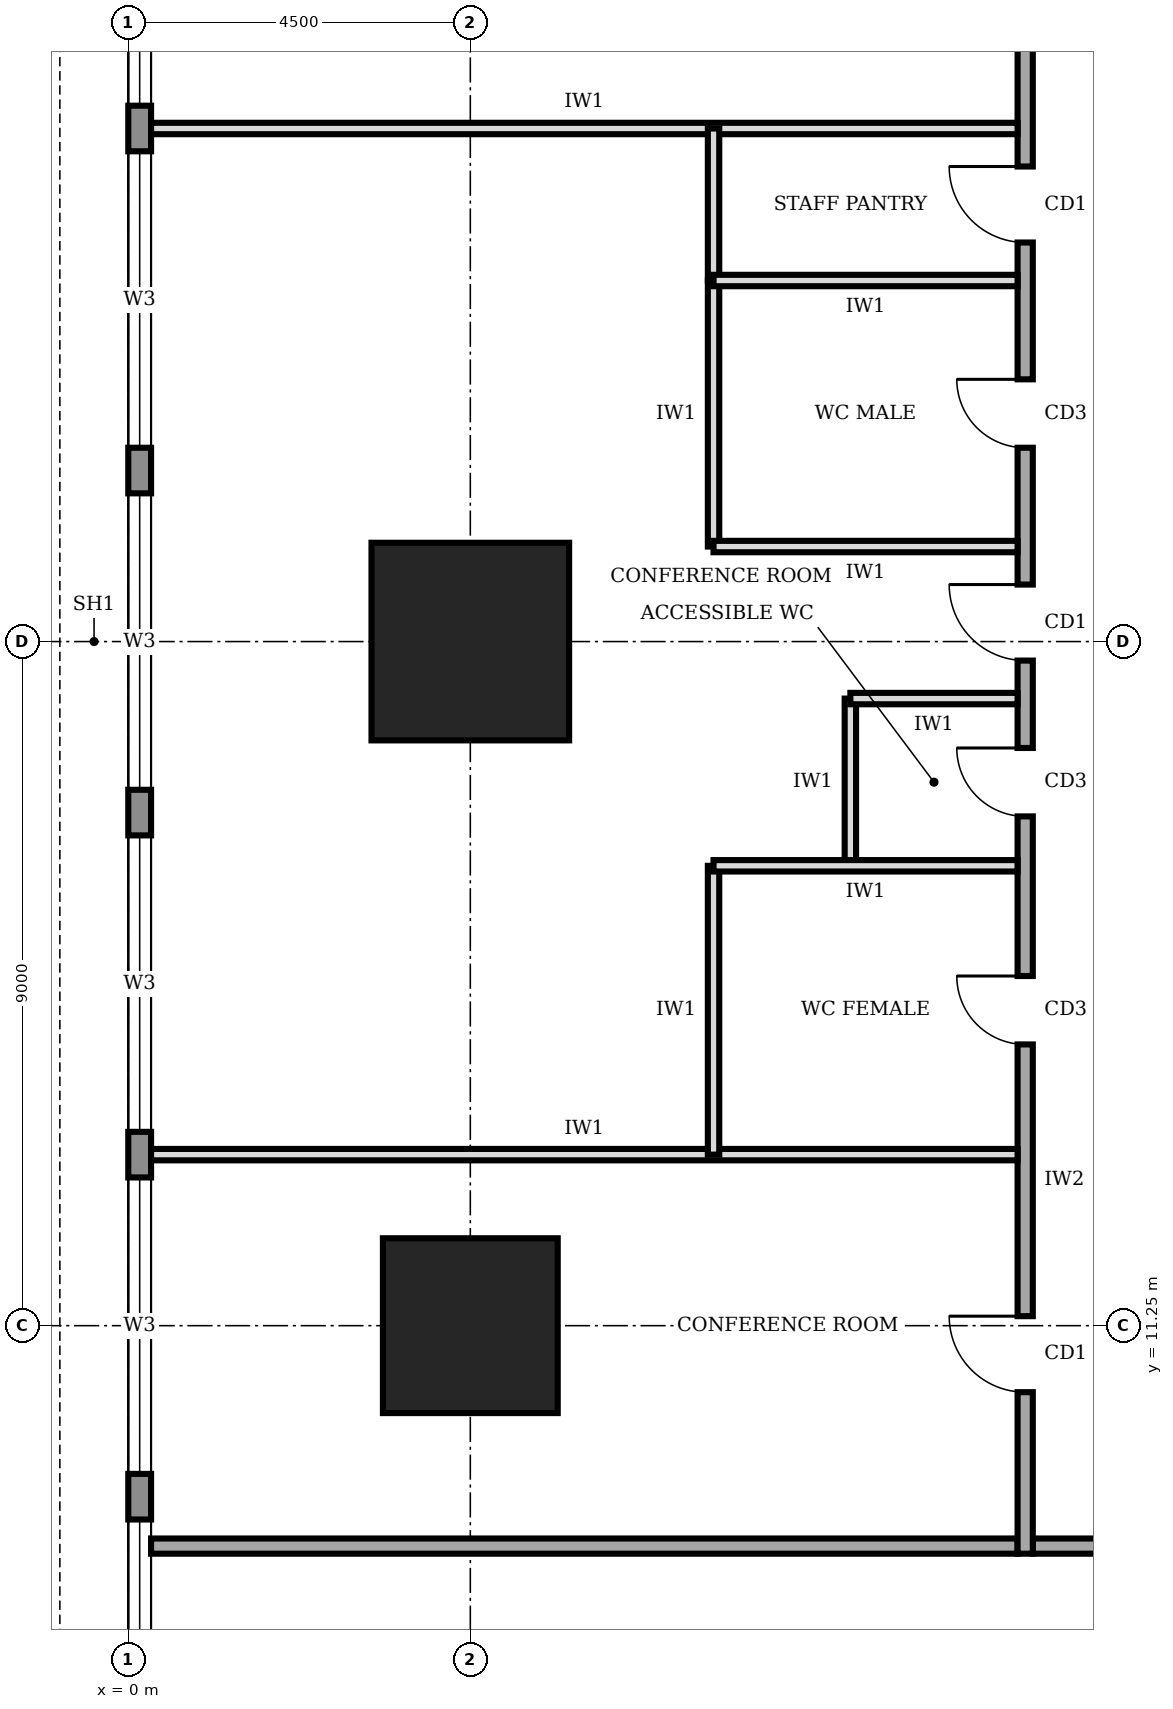
"""IFC4 building model, lengths in metres.
Left out: names, types, materials, properties, quantities, classifications, styles, units other than length and angle.
Written with IfcOpenShell. Run it as: python <this file> out.ifc"""

import sys

from ifc_helpers import new_model, si_unit, direction, frame, frame_2d, origin, origin_2d, place, context, subcontext, project, spatial, rectangle, extrude, element, fill, save


model = new_model("IFC4")
c1 = context("Model", 3, precision=1e-05, world=origin(), true_north=direction((0.0, 1.0)))
c2 = subcontext(c1, "Body", "Model", "MODEL_VIEW")
j1 = project(units=[si_unit("LENGTHUNIT", "METRE"), si_unit("PLANEANGLEUNIT", "RADIAN")], contexts=[c1])
p1 = place(None, origin())
s1 = spatial("IfcSite", under=j1, at=p1, CompositionType="ELEMENT")
p2 = place(p1, origin())
s2 = spatial("IfcBuilding", under=s1, at=p2, CompositionType="ELEMENT")
p3 = place(p2, frame((0.0, 0.0, 101.0)))
s3 = spatial("IfcBuildingStorey", under=s2, at=p3, CompositionType="ELEMENT", Elevation=101.0)
p4 = place(p3, frame((4.5, 11.25, 0.0), z_axis=(0.0, 0.0, 1.0), x_axis=(1.0, 0.0, 0.0)))
e1 = element("IfcColumn", 1, at=p4, inside=s3, PredefinedType="COLUMN", context=c2, shape_type="SweptSolid", body=[
    extrude(rectangle(XDim=2.3, YDim=2.3, at=origin_2d()), origin(), (0.0, 0.0, 1.0), 4.0),
])
p5 = place(p3, frame((4.5, 20.25, 0.0), z_axis=(0.0, 0.0, 1.0), x_axis=(1.0, 0.0, 0.0)))
e2 = element("IfcColumn", 2, at=p5, inside=s3, PredefinedType="COLUMN", context=c2, shape_type="SweptSolid", body=[
    extrude(rectangle(XDim=2.6, YDim=2.6, at=origin_2d()), origin(), (0.0, 0.0, 1.0), 4.0),
])
p6 = place(p3, frame((0.15, 35.98, 0.0), z_axis=(0.0, 0.0, 1.0), x_axis=(0.0, -1.0, 0.0)))
e3 = element("IfcWall", 3, at=p6, inside=s3, PredefinedType="STANDARD", context=c2, shape_type="SweptSolid", body=[
    extrude(rectangle(XDim=31.46, YDim=0.3, at=frame_2d((15.73, 0.0))), origin(), (0.0, 0.0, 1.0), 3.75),
])
p7 = place(p6, frame((27.28, 0.0, 0.95)))
e4 = element("IfcOpeningElement", 4, at=p7, cuts=e3, PredefinedType="OPENING", context=c2, shape_type="SweptSolid", body=[
    extrude(rectangle(XDim=3.9, YDim=1.8, at=frame_2d((1.95, 0.9))), frame((0.0, 0.16, 0.0), z_axis=(0.0, -1.0, 0.0), x_axis=(1.0, 0.0, 0.0)), (0.0, 0.0, 1.0), 0.32),
])
p8 = place(p6, frame((22.78, 0.0, 0.95)))
e5 = element("IfcOpeningElement", 5, at=p8, cuts=e3, PredefinedType="OPENING", context=c2, shape_type="SweptSolid", body=[
    extrude(rectangle(XDim=3.9, YDim=1.8, at=frame_2d((1.95, 0.9))), frame((0.0, 0.16, 0.0), z_axis=(0.0, -1.0, 0.0), x_axis=(1.0, 0.0, 0.0)), (0.0, 0.0, 1.0), 0.32),
])
p9 = place(p6, frame((18.28, 0.0, 0.95)))
e6 = element("IfcOpeningElement", 6, at=p9, cuts=e3, PredefinedType="OPENING", context=c2, shape_type="SweptSolid", body=[
    extrude(rectangle(XDim=3.9, YDim=1.8, at=frame_2d((1.95, 0.9))), frame((0.0, 0.16, 0.0), z_axis=(0.0, -1.0, 0.0), x_axis=(1.0, 0.0, 0.0)), (0.0, 0.0, 1.0), 0.32),
])
p10 = place(p6, frame((13.78, 0.0, 0.95)))
e7 = element("IfcOpeningElement", 7, at=p10, cuts=e3, PredefinedType="OPENING", context=c2, shape_type="SweptSolid", body=[
    extrude(rectangle(XDim=3.9, YDim=1.8, at=frame_2d((1.95, 0.9))), frame((0.0, 0.16, 0.0), z_axis=(0.0, -1.0, 0.0), x_axis=(1.0, 0.0, 0.0)), (0.0, 0.0, 1.0), 0.32),
])
p11 = place(p6, frame((9.28, 0.0, 0.95)))
e8 = element("IfcOpeningElement", 8, at=p11, cuts=e3, PredefinedType="OPENING", context=c2, shape_type="SweptSolid", body=[
    extrude(rectangle(XDim=3.9, YDim=1.8, at=frame_2d((1.95, 0.9))), frame((0.0, 0.16, 0.0), z_axis=(0.0, -1.0, 0.0), x_axis=(1.0, 0.0, 0.0)), (0.0, 0.0, 1.0), 0.32),
])
p12 = place(p6, frame((4.78, 0.0, 0.95)))
e9 = element("IfcOpeningElement", 9, at=p12, cuts=e3, PredefinedType="OPENING", context=c2, shape_type="SweptSolid", body=[
    extrude(rectangle(XDim=3.9, YDim=1.8, at=frame_2d((1.95, 0.9))), frame((0.0, 0.16, 0.0), z_axis=(0.0, -1.0, 0.0), x_axis=(1.0, 0.0, 0.0)), (0.0, 0.0, 1.0), 0.32),
])
p13 = place(p3, frame((11.9, 8.35, 0.0), z_axis=(0.0, 0.0, 1.0), x_axis=(1.0, 0.0, 0.0)))
e10 = element("IfcWall", 10, at=p13, inside=s3, PredefinedType="SOLIDWALL", context=c2, shape_type="SweptSolid", body=[
    extrude(rectangle(XDim=28.3, YDim=0.2, at=frame_2d((14.15, 0.0))), origin(), (0.0, 0.0, 1.0), 3.75),
])
p14 = place(p13, frame((2.25, 0.0, 0.0)))
e11 = element("IfcOpeningElement", 11, at=p14, cuts=e10, PredefinedType="OPENING", context=c2, shape_type="SweptSolid", body=[
    extrude(rectangle(XDim=1.4, YDim=2.1, at=frame_2d((0.7, 1.05))), frame((0.0, 0.11, 0.0), z_axis=(0.0, -1.0, 0.0), x_axis=(1.0, 0.0, 0.0)), (0.0, 0.0, 1.0), 0.22),
])
p15 = place(p13, frame((7.85, 0.0, 0.0)))
e12 = element("IfcOpeningElement", 12, at=p15, cuts=e10, PredefinedType="OPENING", context=c2, shape_type="SweptSolid", body=[
    extrude(rectangle(XDim=1.0, YDim=2.1, at=frame_2d((0.5, 1.05))), frame((0.0, 0.11, 0.0), z_axis=(0.0, -1.0, 0.0), x_axis=(1.0, 0.0, 0.0)), (0.0, 0.0, 1.0), 0.22),
])
p16 = place(p13, frame((18.85, 0.0, 0.0)))
e13 = element("IfcOpeningElement", 13, at=p16, cuts=e10, PredefinedType="OPENING", context=c2, shape_type="SweptSolid", body=[
    extrude(rectangle(XDim=1.4, YDim=2.1, at=frame_2d((0.7, 1.05))), frame((0.0, 0.11, 0.0), z_axis=(0.0, -1.0, 0.0), x_axis=(1.0, 0.0, 0.0)), (0.0, 0.0, 1.0), 0.22),
])
p17 = place(p3, frame((11.8, 32.05, 0.0), z_axis=(0.0, 0.0, 1.0), x_axis=(0.0, -1.0, 0.0)))
e14 = element("IfcWall", 14, at=p17, inside=s3, PredefinedType="SOLIDWALL", context=c2, shape_type="SweptSolid", body=[
    extrude(rectangle(XDim=23.8, YDim=0.2, at=frame_2d((11.9, 0.0))), origin(), (0.0, 0.0, 1.0), 3.75),
])
p18 = place(p17, frame((20.675, 0.0, 0.0)))
e15 = element("IfcOpeningElement", 15, at=p18, cuts=e14, PredefinedType="OPENING", context=c2, shape_type="SweptSolid", body=[
    extrude(rectangle(XDim=1.0, YDim=2.1, at=frame_2d((0.5, 1.05))), frame((0.0, 0.11, 0.0), z_axis=(0.0, -1.0, 0.0), x_axis=(1.0, 0.0, 0.0)), (0.0, 0.0, 1.0), 0.22),
])
p19 = place(p17, frame((16.2, 0.0, 0.0)))
e16 = element("IfcOpeningElement", 16, at=p19, cuts=e14, PredefinedType="OPENING", context=c2, shape_type="SweptSolid", body=[
    extrude(rectangle(XDim=0.9, YDim=2.1, at=frame_2d((0.45, 1.05))), frame((0.0, 0.11, 0.0), z_axis=(0.0, -1.0, 0.0), x_axis=(1.0, 0.0, 0.0)), (0.0, 0.0, 1.0), 0.22),
])
p20 = place(p17, frame((13.2, 0.0, 0.0)))
e17 = element("IfcOpeningElement", 17, at=p20, cuts=e14, PredefinedType="OPENING", context=c2, shape_type="SweptSolid", body=[
    extrude(rectangle(XDim=0.9, YDim=2.1, at=frame_2d((0.45, 1.05))), frame((0.0, 0.11, 0.0), z_axis=(0.0, -1.0, 0.0), x_axis=(1.0, 0.0, 0.0)), (0.0, 0.0, 1.0), 0.22),
])
p21 = place(p17, frame((8.35, 0.0, 0.0)))
e18 = element("IfcOpeningElement", 18, at=p21, cuts=e14, PredefinedType="OPENING", context=c2, shape_type="SweptSolid", body=[
    extrude(rectangle(XDim=0.9, YDim=2.1, at=frame_2d((0.45, 1.05))), frame((0.0, 0.11, 0.0), z_axis=(0.0, -1.0, 0.0), x_axis=(1.0, 0.0, 0.0)), (0.0, 0.0, 1.0), 0.22),
])
p22 = place(p17, frame((5.55, 0.0, 0.0)))
e19 = element("IfcOpeningElement", 19, at=p22, cuts=e14, PredefinedType="OPENING", context=c2, shape_type="SweptSolid", body=[
    extrude(rectangle(XDim=1.0, YDim=2.1, at=frame_2d((0.5, 1.05))), frame((0.0, 0.11, 0.0), z_axis=(0.0, -1.0, 0.0), x_axis=(1.0, 0.0, 0.0)), (0.0, 0.0, 1.0), 0.22),
])
p23 = place(p17, frame((11.05, 0.0, 0.0)))
e20 = element("IfcOpeningElement", 20, at=p23, cuts=e14, PredefinedType="OPENING", context=c2, shape_type="SweptSolid", body=[
    extrude(rectangle(XDim=1.0, YDim=2.1, at=frame_2d((0.5, 1.05))), frame((0.0, 0.11, 0.0), z_axis=(0.0, -1.0, 0.0), x_axis=(1.0, 0.0, 0.0)), (0.0, 0.0, 1.0), 0.22),
])
p24 = place(p17, frame((1.925, 0.0, 0.0)))
e21 = element("IfcOpeningElement", 21, at=p24, cuts=e14, PredefinedType="OPENING", context=c2, shape_type="SweptSolid", body=[
    extrude(rectangle(XDim=1.0, YDim=2.1, at=frame_2d((0.5, 1.05))), frame((0.0, 0.11, 0.0), z_axis=(0.0, -1.0, 0.0), x_axis=(1.0, 0.0, 0.0)), (0.0, 0.0, 1.0), 0.22),
])
p25 = place(p3, frame((0.3, 8.35, 0.0), z_axis=(0.0, 0.0, 1.0), x_axis=(1.0, 0.0, 0.0)))
e22 = element("IfcWall", 22, at=p25, inside=s3, PredefinedType="SOLIDWALL", context=c2, shape_type="SweptSolid", body=[
    extrude(rectangle(XDim=11.4, YDim=0.2, at=frame_2d((5.7, 0.0))), origin(), (0.0, 0.0, 1.0), 3.75),
])
for number, where, z_axis, x_axis in (
    (23, (0.3, 13.5, 0.0), (0.0, 0.0, 1.0), (1.0, 0.0, 0.0)),
    (24, (0.3, 27.0, 0.0), (0.0, 0.0, 1.0), (1.0, 0.0, 0.0)),
):
    element("IfcWall", number, at=place(p3, frame(where, z_axis=z_axis, x_axis=x_axis)), inside=s3, PredefinedType="PARTITIONING", context=c2, shape_type="SweptSolid", body=[
        extrude(rectangle(XDim=11.4, YDim=0.15, at=frame_2d((5.7, 0.0))), origin(), (0.0, 0.0, 1.0), 3.75),
    ])
p26 = place(p3, frame((11.7, 17.3, 0.0), z_axis=(0.0, 0.0, 1.0), x_axis=(-1.0, 0.0, 0.0)))
e25 = element("IfcWall", 25, at=p26, inside=s3, PredefinedType="PARTITIONING", context=c2, shape_type="SweptSolid", body=[
    extrude(rectangle(XDim=4.0, YDim=0.15, at=frame_2d((2.0, 0.0))), origin(), (0.0, 0.0, 1.0), 3.75),
])
p27 = place(p3, frame((11.7, 19.5, 0.0), z_axis=(0.0, 0.0, 1.0), x_axis=(-1.0, 0.0, 0.0)))
e26 = element("IfcWall", 26, at=p27, inside=s3, PredefinedType="PARTITIONING", context=c2, shape_type="SweptSolid", body=[
    extrude(rectangle(XDim=2.2, YDim=0.15, at=frame_2d((1.1, 0.0))), origin(), (0.0, 0.0, 1.0), 2.85),
])
for number, where, z_axis, x_axis in (
    (27, (11.7, 21.5, 0.0), (0.0, 0.0, 1.0), (-1.0, 0.0, 0.0)),
    (28, (11.7, 25.0, 0.0), (0.0, 0.0, 1.0), (-1.0, 0.0, 0.0)),
):
    element("IfcWall", number, at=place(p3, frame(where, z_axis=z_axis, x_axis=x_axis)), inside=s3, PredefinedType="PARTITIONING", context=c2, shape_type="SweptSolid", body=[
        extrude(rectangle(XDim=4.0, YDim=0.15, at=frame_2d((2.0, 0.0))), origin(), (0.0, 0.0, 1.0), 3.75),
    ])
p28 = place(p3, frame((7.7, 13.5, 0.0), z_axis=(0.0, 0.0, 1.0), x_axis=(0.0, 1.0, 0.0)))
e29 = element("IfcWall", 29, at=p28, inside=s3, PredefinedType="PARTITIONING", context=c2, shape_type="SweptSolid", body=[
    extrude(rectangle(XDim=3.8, YDim=0.15, at=frame_2d((1.9, 0.0))), origin(), (0.0, 0.0, 1.0), 3.75),
])
p29 = place(p3, frame((9.5, 17.3, 0.0), z_axis=(0.0, 0.0, 1.0), x_axis=(0.0, 1.0, 0.0)))
e30 = element("IfcWall", 30, at=p29, inside=s3, PredefinedType="PARTITIONING", context=c2, shape_type="SweptSolid", body=[
    extrude(rectangle(XDim=2.2, YDim=0.15, at=frame_2d((1.1, 0.0))), origin(), (0.0, 0.0, 1.0), 3.75),
])
p30 = place(p3, frame((7.7, 21.5, 0.0), z_axis=(0.0, 0.0, 1.0), x_axis=(0.0, 1.0, 0.0)))
e31 = element("IfcWall", 31, at=p30, inside=s3, PredefinedType="PARTITIONING", context=c2, shape_type="SweptSolid", body=[
    extrude(rectangle(XDim=3.5, YDim=0.15, at=frame_2d((1.75, 0.0))), origin(), (0.0, 0.0, 1.0), 3.75),
])
p31 = place(p3, frame((7.7, 25.0, 0.0), z_axis=(0.0, 0.0, 1.0), x_axis=(0.0, 1.0, 0.0)))
e32 = element("IfcWall", 32, at=p31, inside=s3, PredefinedType="PARTITIONING", context=c2, shape_type="SweptSolid", body=[
    extrude(rectangle(XDim=2.0, YDim=0.15, at=frame_2d((1.0, 0.0))), origin(), (0.0, 0.0, 1.0), 3.75),
])
p32 = place(p7, origin())
e33 = element("IfcWindow", 33, at=p32, inside=s3, PartitioningType="SINGLE_PANEL", PredefinedType="WINDOW", context=c2, shape_type="SweptSolid", body=[
    extrude(rectangle(XDim=3.9, YDim=1.8, at=frame_2d((1.95, 0.9))), frame((0.0, 0.03, 0.0), z_axis=(0.0, -1.0, 0.0), x_axis=(1.0, 0.0, 0.0)), (0.0, 0.0, 1.0), 0.06),
])
fill(e4, e33)
p33 = place(p8, origin())
e34 = element("IfcWindow", 34, at=p33, inside=s3, PartitioningType="SINGLE_PANEL", PredefinedType="WINDOW", context=c2, shape_type="SweptSolid", body=[
    extrude(rectangle(XDim=3.9, YDim=1.8, at=frame_2d((1.95, 0.9))), frame((0.0, 0.03, 0.0), z_axis=(0.0, -1.0, 0.0), x_axis=(1.0, 0.0, 0.0)), (0.0, 0.0, 1.0), 0.06),
])
fill(e5, e34)
p34 = place(p9, origin())
e35 = element("IfcWindow", 35, at=p34, inside=s3, PartitioningType="SINGLE_PANEL", PredefinedType="WINDOW", context=c2, shape_type="SweptSolid", body=[
    extrude(rectangle(XDim=3.9, YDim=1.8, at=frame_2d((1.95, 0.9))), frame((0.0, 0.03, 0.0), z_axis=(0.0, -1.0, 0.0), x_axis=(1.0, 0.0, 0.0)), (0.0, 0.0, 1.0), 0.06),
])
fill(e6, e35)
p35 = place(p10, origin())
e36 = element("IfcWindow", 36, at=p35, inside=s3, PartitioningType="SINGLE_PANEL", PredefinedType="WINDOW", context=c2, shape_type="SweptSolid", body=[
    extrude(rectangle(XDim=3.9, YDim=1.8, at=frame_2d((1.95, 0.9))), frame((0.0, 0.03, 0.0), z_axis=(0.0, -1.0, 0.0), x_axis=(1.0, 0.0, 0.0)), (0.0, 0.0, 1.0), 0.06),
])
fill(e7, e36)
p36 = place(p11, origin())
e37 = element("IfcWindow", 37, at=p36, inside=s3, PartitioningType="SINGLE_PANEL", PredefinedType="WINDOW", context=c2, shape_type="SweptSolid", body=[
    extrude(rectangle(XDim=3.9, YDim=1.8, at=frame_2d((1.95, 0.9))), frame((0.0, 0.03, 0.0), z_axis=(0.0, -1.0, 0.0), x_axis=(1.0, 0.0, 0.0)), (0.0, 0.0, 1.0), 0.06),
])
fill(e8, e37)
p37 = place(p12, origin())
e38 = element("IfcWindow", 38, at=p37, inside=s3, PartitioningType="SINGLE_PANEL", PredefinedType="WINDOW", context=c2, shape_type="SweptSolid", body=[
    extrude(rectangle(XDim=3.9, YDim=1.8, at=frame_2d((1.95, 0.9))), frame((0.0, 0.03, 0.0), z_axis=(0.0, -1.0, 0.0), x_axis=(1.0, 0.0, 0.0)), (0.0, 0.0, 1.0), 0.06),
])
fill(e9, e38)
p38 = place(p18, frame((1.0, 0.0, 0.0), z_axis=(0.0, 0.0, 1.0), x_axis=(-1.0, 0.0, 0.0)))
e39 = element("IfcDoor", 39, at=p38, inside=s3, OperationType="SINGLE_SWING_RIGHT", PredefinedType="DOOR", context=c2, shape_type="SweptSolid", body=[
    extrude(rectangle(XDim=1.0, YDim=2.1, at=frame_2d((0.5, 1.05))), frame((0.0, 0.025, 0.0), z_axis=(0.0, -1.0, 0.0), x_axis=(1.0, 0.0, 0.0)), (0.0, 0.0, 1.0), 0.05),
])
fill(e15, e39)
p39 = place(p19, frame((0.9, 0.0, 0.0), z_axis=(0.0, 0.0, 1.0), x_axis=(-1.0, 0.0, 0.0)))
e40 = element("IfcDoor", 40, at=p39, inside=s3, OperationType="SINGLE_SWING_RIGHT", PredefinedType="DOOR", context=c2, shape_type="SweptSolid", body=[
    extrude(rectangle(XDim=0.9, YDim=2.1, at=frame_2d((0.45, 1.05))), frame((0.0, 0.025, 0.0), z_axis=(0.0, -1.0, 0.0), x_axis=(1.0, 0.0, 0.0)), (0.0, 0.0, 1.0), 0.05),
])
fill(e16, e40)
p40 = place(p20, frame((0.9, 0.0, 0.0), z_axis=(0.0, 0.0, 1.0), x_axis=(-1.0, 0.0, 0.0)))
e41 = element("IfcDoor", 41, at=p40, inside=s3, OperationType="SINGLE_SWING_RIGHT", PredefinedType="DOOR", context=c2, shape_type="SweptSolid", body=[
    extrude(rectangle(XDim=0.9, YDim=2.1, at=frame_2d((0.45, 1.05))), frame((0.0, 0.025, 0.0), z_axis=(0.0, -1.0, 0.0), x_axis=(1.0, 0.0, 0.0)), (0.0, 0.0, 1.0), 0.05),
])
fill(e17, e41)
p41 = place(p21, frame((0.9, 0.0, 0.0), z_axis=(0.0, 0.0, 1.0), x_axis=(-1.0, 0.0, 0.0)))
e42 = element("IfcDoor", 42, at=p41, inside=s3, OperationType="SINGLE_SWING_RIGHT", PredefinedType="DOOR", context=c2, shape_type="SweptSolid", body=[
    extrude(rectangle(XDim=0.9, YDim=2.1, at=frame_2d((0.45, 1.05))), frame((0.0, 0.025, 0.0), z_axis=(0.0, -1.0, 0.0), x_axis=(1.0, 0.0, 0.0)), (0.0, 0.0, 1.0), 0.05),
])
fill(e18, e42)
p42 = place(p22, frame((1.0, 0.0, 0.0), z_axis=(0.0, 0.0, 1.0), x_axis=(-1.0, 0.0, 0.0)))
e43 = element("IfcDoor", 43, at=p42, inside=s3, OperationType="SINGLE_SWING_RIGHT", PredefinedType="DOOR", context=c2, shape_type="SweptSolid", body=[
    extrude(rectangle(XDim=1.0, YDim=2.1, at=frame_2d((0.5, 1.05))), frame((0.0, 0.025, 0.0), z_axis=(0.0, -1.0, 0.0), x_axis=(1.0, 0.0, 0.0)), (0.0, 0.0, 1.0), 0.05),
])
fill(e19, e43)
p43 = place(p23, frame((1.0, 0.0, 0.0), z_axis=(0.0, 0.0, 1.0), x_axis=(-1.0, 0.0, 0.0)))
e44 = element("IfcDoor", 44, at=p43, inside=s3, OperationType="SINGLE_SWING_RIGHT", PredefinedType="DOOR", context=c2, shape_type="SweptSolid", body=[
    extrude(rectangle(XDim=1.0, YDim=2.1, at=frame_2d((0.5, 1.05))), frame((0.0, 0.025, 0.0), z_axis=(0.0, -1.0, 0.0), x_axis=(1.0, 0.0, 0.0)), (0.0, 0.0, 1.0), 0.05),
])
fill(e20, e44)
save(model, sys.argv[1])
